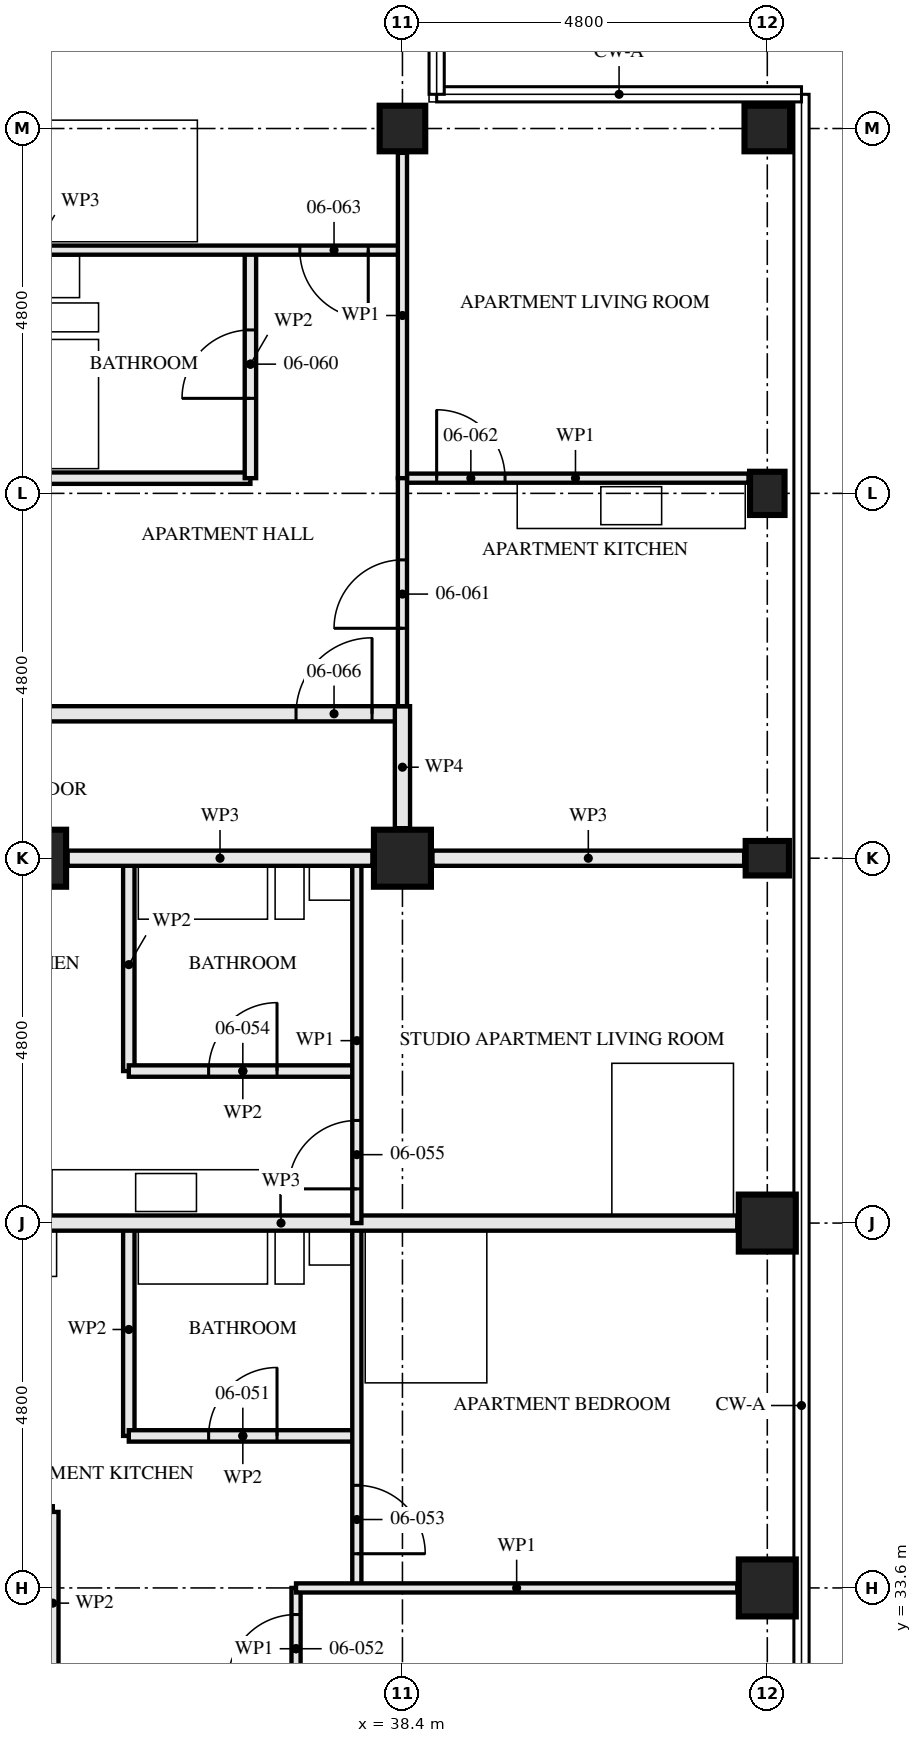
"""IFC4 building model, lengths in metres.
Left out: names, types, materials, properties, quantities, classifications, styles, units other than length and angle.
Written with IfcOpenShell. Run it as: python <this file> out.ifc"""

import sys

from ifc_helpers import new_model, si_unit, direction, frame, frame_2d, origin, origin_2d, place, context, subcontext, project, spatial, rectangle, hollow_rectangle, i_section, extrude, element, fill, save


model = new_model("IFC4")
c1 = context("Model", 3, precision=1e-05, world=origin(), true_north=direction((0.0, 1.0)))
c2 = subcontext(c1, "Body", "Model", "MODEL_VIEW")
j1 = project(units=[si_unit("LENGTHUNIT", "METRE"), si_unit("PLANEANGLEUNIT", "RADIAN")], contexts=[c1])
p1 = place(None, origin())
s1 = spatial("IfcSite", under=j1, at=p1, CompositionType="ELEMENT")
p2 = place(p1, origin())
s2 = spatial("IfcBuilding", under=s1, at=p2, CompositionType="ELEMENT")
p3 = place(p2, frame((0.0, 0.0, 27.0)))
s3 = spatial("IfcBuildingStorey", under=s2, at=p3, CompositionType="ELEMENT", Elevation=27.0)
for number, where, z_axis, x_axis in (
    (1, (33.6, 43.2, 0.0), (0.0, 0.0, 1.0), (0.0, 1.0, 0.0)),
    (2, (38.4, 43.2, 0.0), (0.0, 0.0, 1.0), (0.0, 1.0, 0.0)),
):
    element("IfcColumn", number, at=place(p3, frame(where, z_axis=z_axis, x_axis=x_axis)), inside=s3, PredefinedType="COLUMN", context=c2, shape_type="SweptSolid", body=[
        extrude(hollow_rectangle(XDim=0.75, YDim=0.75, WallThickness=0.08, at=origin_2d()), origin(), (0.0, 0.0, 1.0), 3.5),
    ])
p4 = place(p3, frame((38.4, 52.8, 0.0), z_axis=(0.0, 0.0, 1.0), x_axis=(0.0, 1.0, 0.0)))
e3 = element("IfcColumn", 3, at=p4, inside=s3, PredefinedType="COLUMN", context=c2, shape_type="SweptSolid", body=[
    extrude(hollow_rectangle(XDim=0.6, YDim=0.6, WallThickness=0.05, at=origin_2d()), origin(), (0.0, 0.0, 1.0), 3.5),
])
for number, where, z_axis, x_axis in (
    (4, (43.2, 33.6, 0.0), (0.0, 0.0, 1.0), (1.0, 0.0, 0.0)),
    (5, (43.2, 38.4, 0.0), (0.0, 0.0, 1.0), (1.0, 0.0, 0.0)),
):
    element("IfcColumn", number, at=place(p3, frame(where, z_axis=z_axis, x_axis=x_axis)), inside=s3, PredefinedType="COLUMN", context=c2, shape_type="SweptSolid", body=[
        extrude(hollow_rectangle(XDim=0.75, YDim=0.75, WallThickness=0.08, at=origin_2d()), origin(), (0.0, 0.0, 1.0), 3.5),
    ])
for number, where, z_axis, x_axis in (
    (6, (43.2, 43.2, 0.0), (0.0, 0.0, 1.0), (0.0, 1.0, 0.0)),
    (7, (43.2, 48.0, 0.0), (0.0, 0.0, 1.0), (1.0, 0.0, 0.0)),
):
    element("IfcColumn", number, at=place(p3, frame(where, z_axis=z_axis, x_axis=x_axis)), inside=s3, PredefinedType="COLUMN", context=c2, shape_type="SweptSolid", body=[
        extrude(i_section(OverallWidth=0.454, OverallDepth=0.569, WebThickness=0.078, FlangeThickness=0.125, FilletRadius=0.015, at=origin_2d()), origin(), (0.0, 0.0, 1.0), 3.5),
    ])
p5 = place(p3, frame((43.2, 52.8, 0.0), z_axis=(0.0, 0.0, 1.0), x_axis=(0.0, 1.0, 0.0)))
e8 = element("IfcColumn", 8, at=p5, inside=s3, PredefinedType="COLUMN", context=c2, shape_type="SweptSolid", body=[
    extrude(hollow_rectangle(XDim=0.6, YDim=0.6, WallThickness=0.05, at=origin_2d()), origin(), (0.0, 0.0, 1.0), 3.5),
])
p6 = place(p3, frame((33.8, 32.2, 0.0), z_axis=(0.0, 0.0, 1.0), x_axis=(0.0, 1.0, 0.0)))
e9 = element("IfcWall", 9, at=p6, inside=s3, PredefinedType="PARTITIONING", context=c2, shape_type="SweptSolid", body=[
    extrude(rectangle(XDim=2.4, YDim=0.15, at=frame_2d((1.2, 0.0))), origin(), (0.0, 0.0, 1.0), 2.55),
])
p7 = place(p3, frame((37.8, 35.6, 0.0), z_axis=(0.0, 0.0, 1.0), x_axis=(-1.0, 0.0, 0.0)))
e10 = element("IfcWall", 10, at=p7, inside=s3, PredefinedType="PARTITIONING", context=c2, shape_type="SweptSolid", body=[
    extrude(rectangle(XDim=3.0, YDim=0.15, at=frame_2d((1.5, 0.0))), origin(), (0.0, 0.0, 1.0), 3.33),
])
p8 = place(p7, frame((1.05, 0.0, 0.0)))
e11 = element("IfcOpeningElement", 11, at=p8, cuts=e10, PredefinedType="OPENING", context=c2, shape_type="SweptSolid", body=[
    extrude(rectangle(XDim=0.9, YDim=2.1, at=frame_2d((0.45, 1.05))), frame((0.0, 0.085, 0.0), z_axis=(0.0, -1.0, 0.0), x_axis=(1.0, 0.0, 0.0)), (0.0, 0.0, 1.0), 0.171),
])
p9 = place(p3, frame((34.8, 35.6, 0.0), z_axis=(0.0, 0.0, 1.0), x_axis=(0.0, 1.0, 0.0)))
e12 = element("IfcWall", 12, at=p9, inside=s3, PredefinedType="PARTITIONING", context=c2, shape_type="SweptSolid", body=[
    extrude(rectangle(XDim=2.8, YDim=0.15, at=frame_2d((1.4, 0.0))), origin(), (0.0, 0.0, 1.0), 3.33),
])
p10 = place(p3, frame((37.0, 32.0, 0.0), z_axis=(0.0, 0.0, 1.0), x_axis=(0.0, 1.0, 0.0)))
e13 = element("IfcWall", 13, at=p10, inside=s3, PredefinedType="PARTITIONING", context=c2, shape_type="SweptSolid", body=[
    extrude(rectangle(XDim=1.6, YDim=0.12, at=frame_2d((0.8, 0.0))), origin(), (0.0, 0.0, 1.0), 3.33),
])
p11 = place(p10, frame((0.35, 0.0, 0.0)))
e14 = element("IfcOpeningElement", 14, at=p11, cuts=e13, PredefinedType="OPENING", context=c2, shape_type="SweptSolid", body=[
    extrude(rectangle(XDim=0.9, YDim=2.1, at=frame_2d((0.45, 1.05))), frame((0.0, 0.071, 0.0), z_axis=(0.0, -1.0, 0.0), x_axis=(1.0, 0.0, 0.0)), (0.0, 0.0, 1.0), 0.141),
])
p12 = place(p3, frame((37.8, 33.6, 0.0), z_axis=(0.0, 0.0, 1.0), x_axis=(0.0, 1.0, 0.0)))
e15 = element("IfcWall", 15, at=p12, inside=s3, PredefinedType="PARTITIONING", context=c2, shape_type="SweptSolid", body=[
    extrude(rectangle(XDim=4.8, YDim=0.12, at=frame_2d((2.4, 0.0))), origin(), (0.0, 0.0, 1.0), 3.33),
])
p13 = place(p12, frame((0.45, 0.0, 0.0)))
e16 = element("IfcOpeningElement", 16, at=p13, cuts=e15, PredefinedType="OPENING", context=c2, shape_type="SweptSolid", body=[
    extrude(rectangle(XDim=0.9, YDim=2.1, at=frame_2d((0.45, 1.05))), frame((0.0, 0.071, 0.0), z_axis=(0.0, -1.0, 0.0), x_axis=(1.0, 0.0, 0.0)), (0.0, 0.0, 1.0), 0.141),
])
p14 = place(p3, frame((42.805, 33.6, 0.0), z_axis=(0.0, 0.0, 1.0), x_axis=(-1.0, 0.0, 0.0)))
e17 = element("IfcWall", 17, at=p14, inside=s3, PredefinedType="PARTITIONING", context=c2, shape_type="SweptSolid", body=[
    extrude(rectangle(XDim=5.805, YDim=0.12, at=frame_2d((2.902, 0.0))), origin(), (0.0, 0.0, 1.0), 2.55),
])
p15 = place(p3, frame((42.805, 38.4, 0.0), z_axis=(0.0, 0.0, 1.0), x_axis=(-1.0, 0.0, 0.0)))
e18 = element("IfcWall", 18, at=p15, inside=s3, PredefinedType="PARTITIONING", context=c2, shape_type="SweptSolid", body=[
    extrude(rectangle(XDim=12.005, YDim=0.2, at=frame_2d((6.002, 0.0))), origin(), (0.0, 0.0, 1.0), 2.55),
])
p16 = place(p3, frame((37.8, 40.4, 0.0), z_axis=(0.0, 0.0, 1.0), x_axis=(-1.0, 0.0, 0.0)))
e19 = element("IfcWall", 19, at=p16, inside=s3, PredefinedType="PARTITIONING", context=c2, shape_type="SweptSolid", body=[
    extrude(rectangle(XDim=3.0, YDim=0.15, at=frame_2d((1.5, 0.0))), origin(), (0.0, 0.0, 1.0), 3.33),
])
p17 = place(p16, frame((1.05, 0.0, 0.0)))
e20 = element("IfcOpeningElement", 20, at=p17, cuts=e19, PredefinedType="OPENING", context=c2, shape_type="SweptSolid", body=[
    extrude(rectangle(XDim=0.9, YDim=2.1, at=frame_2d((0.45, 1.05))), frame((0.0, 0.085, 0.0), z_axis=(0.0, -1.0, 0.0), x_axis=(1.0, 0.0, 0.0)), (0.0, 0.0, 1.0), 0.171),
])
p18 = place(p3, frame((34.8, 40.4, 0.0), z_axis=(0.0, 0.0, 1.0), x_axis=(0.0, 1.0, 0.0)))
e21 = element("IfcWall", 21, at=p18, inside=s3, PredefinedType="PARTITIONING", context=c2, shape_type="SweptSolid", body=[
    extrude(rectangle(XDim=2.8, YDim=0.15, at=frame_2d((1.4, 0.0))), origin(), (0.0, 0.0, 1.0), 3.33),
])
p19 = place(p3, frame((37.8, 38.4, 0.0), z_axis=(0.0, 0.0, 1.0), x_axis=(0.0, 1.0, 0.0)))
e22 = element("IfcWall", 22, at=p19, inside=s3, PredefinedType="PARTITIONING", context=c2, shape_type="SweptSolid", body=[
    extrude(rectangle(XDim=4.8, YDim=0.12, at=frame_2d((2.4, 0.0))), origin(), (0.0, 0.0, 1.0), 3.33),
])
p20 = place(p19, frame((0.45, 0.0, 0.0)))
e23 = element("IfcOpeningElement", 23, at=p20, cuts=e22, PredefinedType="OPENING", context=c2, shape_type="SweptSolid", body=[
    extrude(rectangle(XDim=0.9, YDim=2.1, at=frame_2d((0.45, 1.05))), frame((0.0, 0.071, 0.0), z_axis=(0.0, -1.0, 0.0), x_axis=(1.0, 0.0, 0.0)), (0.0, 0.0, 1.0), 0.141),
])
p21 = place(p3, frame((36.4, 51.2, 0.0), z_axis=(0.0, 0.0, 1.0), x_axis=(0.0, -1.0, 0.0)))
e24 = element("IfcWall", 24, at=p21, inside=s3, PredefinedType="PARTITIONING", context=c2, shape_type="SweptSolid", body=[
    extrude(rectangle(XDim=3.0, YDim=0.15, at=frame_2d((1.5, 0.0))), origin(), (0.0, 0.0, 1.0), 3.33),
])
p22 = place(p21, frame((1.05, 0.0, 0.0)))
e25 = element("IfcOpeningElement", 25, at=p22, cuts=e24, PredefinedType="OPENING", context=c2, shape_type="SweptSolid", body=[
    extrude(rectangle(XDim=0.9, YDim=2.1, at=frame_2d((0.45, 1.05))), frame((0.0, 0.085, 0.0), z_axis=(0.0, -1.0, 0.0), x_axis=(1.0, 0.0, 0.0)), (0.0, 0.0, 1.0), 0.171),
])
p23 = place(p3, frame((36.4, 48.2, 0.0), z_axis=(0.0, 0.0, 1.0), x_axis=(-1.0, 0.0, 0.0)))
e26 = element("IfcWall", 26, at=p23, inside=s3, PredefinedType="PARTITIONING", context=c2, shape_type="SweptSolid", body=[
    extrude(rectangle(XDim=2.8, YDim=0.15, at=frame_2d((1.4, 0.0))), origin(), (0.0, 0.0, 1.0), 3.33),
])
p24 = place(p3, frame((38.4, 48.2, 0.0), z_axis=(0.0, 0.0, 1.0), x_axis=(0.0, -1.0, 0.0)))
e27 = element("IfcWall", 27, at=p24, inside=s3, PredefinedType="PARTITIONING", context=c2, shape_type="SweptSolid", body=[
    extrude(rectangle(XDim=3.0, YDim=0.12, at=frame_2d((1.5, 0.0))), origin(), (0.0, 0.0, 1.0), 2.55),
])
p25 = place(p24, frame((1.075, 0.0, 0.0)))
e28 = element("IfcOpeningElement", 28, at=p25, cuts=e27, PredefinedType="OPENING", context=c2, shape_type="SweptSolid", body=[
    extrude(rectangle(XDim=0.9, YDim=2.1, at=frame_2d((0.45, 1.05))), frame((0.0, 0.071, 0.0), z_axis=(0.0, -1.0, 0.0), x_axis=(1.0, 0.0, 0.0)), (0.0, 0.0, 1.0), 0.141),
])
p26 = place(p3, frame((42.953, 48.2, 0.0), z_axis=(0.0, 0.0, 1.0), x_axis=(-1.0, 0.0, 0.0)))
e29 = element("IfcWall", 29, at=p26, inside=s3, PredefinedType="PARTITIONING", context=c2, shape_type="SweptSolid", body=[
    extrude(rectangle(XDim=4.553, YDim=0.12, at=frame_2d((2.276, 0.0))), origin(), (0.0, 0.0, 1.0), 3.33),
])
p27 = place(p26, frame((3.203, 0.0, 0.0)))
e30 = element("IfcOpeningElement", 30, at=p27, cuts=e29, PredefinedType="OPENING", context=c2, shape_type="SweptSolid", body=[
    extrude(rectangle(XDim=0.9, YDim=2.1, at=frame_2d((0.45, 1.05))), frame((0.0, 0.071, 0.0), z_axis=(0.0, -1.0, 0.0), x_axis=(1.0, 0.0, 0.0)), (0.0, 0.0, 1.0), 0.141),
])
p28 = place(p3, frame((38.4, 51.2, 0.0), z_axis=(0.0, 0.0, 1.0), x_axis=(-1.0, 0.0, 0.0)))
e31 = element("IfcWall", 31, at=p28, inside=s3, PredefinedType="PARTITIONING", context=c2, shape_type="SweptSolid", body=[
    extrude(rectangle(XDim=4.8, YDim=0.12, at=frame_2d((2.4, 0.0))), origin(), (0.0, 0.0, 1.0), 3.33),
])
p29 = place(p28, frame((0.45, 0.0, 0.0)))
e32 = element("IfcOpeningElement", 32, at=p29, cuts=e31, PredefinedType="OPENING", context=c2, shape_type="SweptSolid", body=[
    extrude(rectangle(XDim=0.9, YDim=2.1, at=frame_2d((0.45, 1.05))), frame((0.0, 0.071, 0.0), z_axis=(0.0, -1.0, 0.0), x_axis=(1.0, 0.0, 0.0)), (0.0, 0.0, 1.0), 0.141),
])
p30 = place(p3, frame((38.4, 52.48, 0.0), z_axis=(0.0, 0.0, 1.0), x_axis=(0.0, -1.0, 0.0)))
e33 = element("IfcWall", 33, at=p30, inside=s3, PredefinedType="PARTITIONING", context=c2, shape_type="SweptSolid", body=[
    extrude(rectangle(XDim=4.28, YDim=0.12, at=frame_2d((2.14, 0.0))), origin(), (0.0, 0.0, 1.0), 3.33),
])
p31 = place(p3, frame((38.4, 45.1, 0.0), z_axis=(0.0, 0.0, 1.0), x_axis=(-1.0, 0.0, 0.0)))
e34 = element("IfcWall", 34, at=p31, inside=s3, PredefinedType="PARTITIONING", context=c2, shape_type="SweptSolid", body=[
    extrude(rectangle(XDim=9.6, YDim=0.2, at=frame_2d((4.8, 0.0))), origin(), (0.0, 0.0, 1.0), 3.33),
])
p32 = place(p31, frame((0.4, 0.0, 0.0)))
e35 = element("IfcOpeningElement", 35, at=p32, cuts=e34, PredefinedType="OPENING", context=c2, shape_type="SweptSolid", body=[
    extrude(rectangle(XDim=1.0, YDim=2.1, at=frame_2d((0.5, 1.05))), frame((0.0, 0.111, 0.0), z_axis=(0.0, -1.0, 0.0), x_axis=(1.0, 0.0, 0.0)), (0.0, 0.0, 1.0), 0.221),
])
p33 = place(p31, frame((5.2, 0.0, 0.0)))
e36 = element("IfcOpeningElement", 36, at=p33, cuts=e34, PredefinedType="OPENING", context=c2, shape_type="SweptSolid", body=[
    extrude(rectangle(XDim=1.0, YDim=2.1, at=frame_2d((0.5, 1.05))), frame((0.0, 0.111, 0.0), z_axis=(0.0, -1.0, 0.0), x_axis=(1.0, 0.0, 0.0)), (0.0, 0.0, 1.0), 0.221),
])
p34 = place(p3, frame((38.4, 45.2, 0.0), z_axis=(0.0, 0.0, 1.0), x_axis=(0.0, -1.0, 0.0)))
e37 = element("IfcWall", 37, at=p34, inside=s3, PredefinedType="PARTITIONING", context=c2, shape_type="SweptSolid", body=[
    extrude(rectangle(XDim=1.605, YDim=0.2, at=frame_2d((0.802, 0.0))), origin(), (0.0, 0.0, 1.0), 3.33),
])
p35 = place(p3, frame((42.896, 43.2, 0.0), z_axis=(0.0, 0.0, 1.0), x_axis=(-1.0, 0.0, 0.0)))
e38 = element("IfcWall", 38, at=p35, inside=s3, PredefinedType="PARTITIONING", context=c2, shape_type="SweptSolid", body=[
    extrude(rectangle(XDim=4.101, YDim=0.2, at=frame_2d((2.05, 0.0))), origin(), (0.0, 0.0, 1.0), 2.32),
])
p36 = place(p3, frame((38.005, 43.2, 0.0), z_axis=(0.0, 0.0, 1.0), x_axis=(-1.0, 0.0, 0.0)))
e39 = element("IfcWall", 39, at=p36, inside=s3, PredefinedType="PARTITIONING", context=c2, shape_type="SweptSolid", body=[
    extrude(rectangle(XDim=4.01, YDim=0.2, at=frame_2d((2.005, 0.0))), origin(), (0.0, 0.0, 1.0), 2.32),
])
p37 = place(p8, frame((0.9, 0.0, 0.0), z_axis=(0.0, 0.0, 1.0), x_axis=(-1.0, 0.0, 0.0)))
e40 = element("IfcDoor", 40, at=p37, inside=s3, OperationType="SINGLE_SWING_LEFT", PredefinedType="DOOR", context=c2, shape_type="SweptSolid", body=[
    extrude(rectangle(XDim=0.9, YDim=2.1, at=frame_2d((0.45, 1.05))), frame((0.0, 0.022, 0.0), z_axis=(0.0, -1.0, 0.0), x_axis=(1.0, 0.0, 0.0)), (0.0, 0.0, 1.0), 0.044),
])
fill(e11, e40)
p38 = place(p11, origin())
e41 = element("IfcDoor", 41, at=p38, inside=s3, OperationType="SINGLE_SWING_RIGHT", PredefinedType="DOOR", context=c2, shape_type="SweptSolid", body=[
    extrude(rectangle(XDim=0.9, YDim=2.1, at=frame_2d((0.45, 1.05))), frame((0.0, 0.022, 0.0), z_axis=(0.0, -1.0, 0.0), x_axis=(1.0, 0.0, 0.0)), (0.0, 0.0, 1.0), 0.044),
])
fill(e14, e41)
p39 = place(p13, frame((0.9, 0.0, 0.0), z_axis=(0.0, 0.0, 1.0), x_axis=(-1.0, 0.0, 0.0)))
e42 = element("IfcDoor", 42, at=p39, inside=s3, OperationType="SINGLE_SWING_LEFT", PredefinedType="DOOR", context=c2, shape_type="SweptSolid", body=[
    extrude(rectangle(XDim=0.9, YDim=2.1, at=frame_2d((0.45, 1.05))), frame((0.0, 0.022, 0.0), z_axis=(0.0, -1.0, 0.0), x_axis=(1.0, 0.0, 0.0)), (0.0, 0.0, 1.0), 0.044),
])
fill(e16, e42)
p40 = place(p17, frame((0.9, 0.0, 0.0), z_axis=(0.0, 0.0, 1.0), x_axis=(-1.0, 0.0, 0.0)))
e43 = element("IfcDoor", 43, at=p40, inside=s3, OperationType="SINGLE_SWING_LEFT", PredefinedType="DOOR", context=c2, shape_type="SweptSolid", body=[
    extrude(rectangle(XDim=0.9, YDim=2.1, at=frame_2d((0.45, 1.05))), frame((0.0, 0.022, 0.0), z_axis=(0.0, -1.0, 0.0), x_axis=(1.0, 0.0, 0.0)), (0.0, 0.0, 1.0), 0.044),
])
fill(e20, e43)
p41 = place(p20, origin())
e44 = element("IfcDoor", 44, at=p41, inside=s3, OperationType="SINGLE_SWING_RIGHT", PredefinedType="DOOR", context=c2, shape_type="SweptSolid", body=[
    extrude(rectangle(XDim=0.9, YDim=2.1, at=frame_2d((0.45, 1.05))), frame((0.0, 0.022, 0.0), z_axis=(0.0, -1.0, 0.0), x_axis=(1.0, 0.0, 0.0)), (0.0, 0.0, 1.0), 0.044),
])
fill(e23, e44)
p42 = place(p22, frame((0.9, 0.0, 0.0), z_axis=(0.0, 0.0, 1.0), x_axis=(-1.0, 0.0, 0.0)))
e45 = element("IfcDoor", 45, at=p42, inside=s3, OperationType="SINGLE_SWING_RIGHT", PredefinedType="DOOR", context=c2, shape_type="SweptSolid", body=[
    extrude(rectangle(XDim=0.9, YDim=2.1, at=frame_2d((0.45, 1.05))), frame((0.0, 0.022, 0.0), z_axis=(0.0, -1.0, 0.0), x_axis=(1.0, 0.0, 0.0)), (0.0, 0.0, 1.0), 0.044),
])
fill(e25, e45)
p43 = place(p25, frame((0.9, 0.0, 0.0), z_axis=(0.0, 0.0, 1.0), x_axis=(-1.0, 0.0, 0.0)))
e46 = element("IfcDoor", 46, at=p43, inside=s3, OperationType="SINGLE_SWING_RIGHT", PredefinedType="DOOR", context=c2, shape_type="SweptSolid", body=[
    extrude(rectangle(XDim=0.9, YDim=2.1, at=frame_2d((0.45, 1.05))), frame((0.0, 0.022, 0.0), z_axis=(0.0, -1.0, 0.0), x_axis=(1.0, 0.0, 0.0)), (0.0, 0.0, 1.0), 0.044),
])
fill(e28, e46)
p44 = place(p27, frame((0.9, 0.0, 0.0), z_axis=(0.0, 0.0, 1.0), x_axis=(-1.0, 0.0, 0.0)))
e47 = element("IfcDoor", 47, at=p44, inside=s3, OperationType="SINGLE_SWING_RIGHT", PredefinedType="DOOR", context=c2, shape_type="SweptSolid", body=[
    extrude(rectangle(XDim=0.9, YDim=2.1, at=frame_2d((0.45, 1.05))), frame((0.0, 0.022, 0.0), z_axis=(0.0, -1.0, 0.0), x_axis=(1.0, 0.0, 0.0)), (0.0, 0.0, 1.0), 0.044),
])
fill(e30, e47)
p45 = place(p29, origin())
e48 = element("IfcDoor", 48, at=p45, inside=s3, OperationType="SINGLE_SWING_RIGHT", PredefinedType="DOOR", context=c2, shape_type="SweptSolid", body=[
    extrude(rectangle(XDim=0.9, YDim=2.1, at=frame_2d((0.45, 1.05))), frame((0.0, 0.022, 0.0), z_axis=(0.0, -1.0, 0.0), x_axis=(1.0, 0.0, 0.0)), (0.0, 0.0, 1.0), 0.044),
])
fill(e32, e48)
p46 = place(p32, frame((1.0, 0.0, 0.0), z_axis=(0.0, 0.0, 1.0), x_axis=(-1.0, 0.0, 0.0)))
e49 = element("IfcDoor", 49, at=p46, inside=s3, OperationType="SINGLE_SWING_LEFT", PredefinedType="DOOR", context=c2, shape_type="SweptSolid", body=[
    extrude(rectangle(XDim=1.0, YDim=2.1, at=frame_2d((0.5, 1.05))), frame((0.0, 0.027, 0.0), z_axis=(0.0, -1.0, 0.0), x_axis=(1.0, 0.0, 0.0)), (0.0, 0.0, 1.0), 0.054),
])
fill(e35, e49)
save(model, sys.argv[1])
